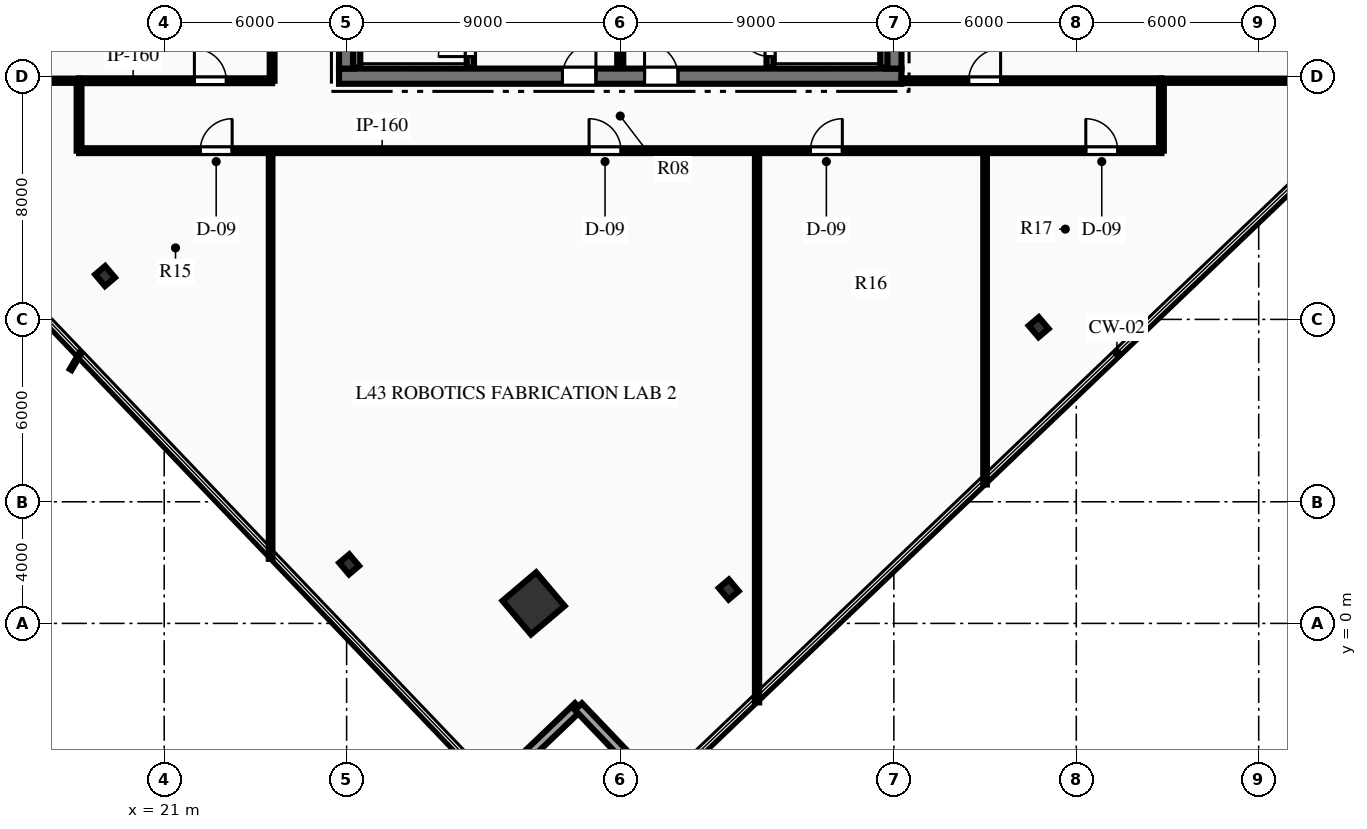
"""IFC4 building model, lengths in metres.
Left out: names, types, materials, properties, quantities, classifications, styles, units other than length and angle.
Written with IfcOpenShell. Run it as: python <this file> out.ifc"""

import sys

from ifc_helpers import new_model, si_unit, direction, frame, frame_2d, origin, origin_2d, place, context, subcontext, project, spatial, rectangle, hollow_rectangle, i_section, extrude, element, fill, save


model = new_model("IFC4")
c1 = context("Model", 3, precision=1e-05, world=origin(), true_north=direction((0.0, 1.0)))
c2 = subcontext(c1, "Body", "Model", "MODEL_VIEW")
j1 = project(units=[si_unit("LENGTHUNIT", "METRE"), si_unit("PLANEANGLEUNIT", "RADIAN")], contexts=[c1])
p1 = place(None, origin())
s1 = spatial("IfcSite", under=j1, at=p1, CompositionType="ELEMENT")
p2 = place(p1, origin())
s2 = spatial("IfcBuilding", under=s1, at=p2, CompositionType="ELEMENT")
p3 = place(p2, frame((0.0, 0.0, 174.45)))
s3 = spatial("IfcBuildingStorey", under=s2, at=p3, CompositionType="ELEMENT", Elevation=174.45)
p4 = place(p3, frame((26.75, 18.0, 0.0), z_axis=(0.0, 0.0, 1.0), x_axis=(1.0, 0.0, 0.0)))
e1 = element("IfcWall", 1, at=p4, inside=s3, PredefinedType="SHEAR", context=c2, shape_type="SweptSolid", body=[
    extrude(rectangle(XDim=18.5, YDim=0.5, at=frame_2d((9.25, 0.0))), origin(), (0.0, 0.0, 1.0), 3.75),
])
p5 = place(p4, frame((7.35, 0.0, 0.0)))
e2 = element("IfcOpeningElement", 2, at=p5, cuts=e1, PredefinedType="OPENING", context=c2, shape_type="SweptSolid", body=[
    extrude(rectangle(XDim=1.1, YDim=2.15, at=frame_2d((0.55, 1.075))), frame((0.0, 0.26, 0.0), z_axis=(0.0, -1.0, 0.0), x_axis=(1.0, 0.0, 0.0)), (0.0, 0.0, 1.0), 0.52),
])
p6 = place(p4, frame((10.05, 0.0, 0.0)))
e3 = element("IfcOpeningElement", 3, at=p6, cuts=e1, PredefinedType="OPENING", context=c2, shape_type="SweptSolid", body=[
    extrude(rectangle(XDim=1.1, YDim=2.15, at=frame_2d((0.55, 1.075))), frame((0.0, 0.26, 0.0), z_axis=(0.0, -1.0, 0.0), x_axis=(1.0, 0.0, 0.0)), (0.0, 0.0, 1.0), 0.52),
])
p7 = place(p3, frame((27.0, 18.25, 0.0), z_axis=(0.0, 0.0, 1.0), x_axis=(0.0, 1.0, 0.0)))
e4 = element("IfcWall", 4, at=p7, inside=s3, PredefinedType="SHEAR", context=c2, shape_type="SweptSolid", body=[
    extrude(rectangle(XDim=15.5, YDim=0.5, at=frame_2d((7.75, 0.0))), origin(), (0.0, 0.0, 1.0), 3.75),
])
p8 = place(p7, frame((9.99, 0.0, 0.0)))
e5 = element("IfcOpeningElement", 5, at=p8, cuts=e4, PredefinedType="OPENING", context=c2, shape_type="SweptSolid", body=[
    extrude(rectangle(XDim=1.4, YDim=2.2, at=frame_2d((0.7, 1.1))), frame((0.0, 0.26, 0.0), z_axis=(0.0, -1.0, 0.0), x_axis=(1.0, 0.0, 0.0)), (0.0, 0.0, 1.0), 0.52),
])
p9 = place(p3, frame((45.0, 18.25, 0.0), z_axis=(0.0, 0.0, 1.0), x_axis=(0.0, 1.0, 0.0)))
e6 = element("IfcWall", 6, at=p9, inside=s3, PredefinedType="SHEAR", context=c2, shape_type="SweptSolid", body=[
    extrude(rectangle(XDim=15.5, YDim=0.5, at=frame_2d((7.75, 0.0))), origin(), (0.0, 0.0, 1.0), 3.75),
])
p10 = place(p9, frame((9.99, 0.0, 0.0)))
e7 = element("IfcOpeningElement", 7, at=p10, cuts=e6, PredefinedType="OPENING", context=c2, shape_type="SweptSolid", body=[
    extrude(rectangle(XDim=1.4, YDim=2.2, at=frame_2d((0.7, 1.1))), frame((0.0, 0.26, 0.0), z_axis=(0.0, -1.0, 0.0), x_axis=(1.0, 0.0, 0.0)), (0.0, 0.0, 1.0), 0.52),
])
p11 = place(p3, frame((31.07, 18.28, 0.0), z_axis=(0.0, 0.0, 1.0), x_axis=(0.0, 1.0, 0.0)))
e8 = element("IfcWall", 8, at=p11, inside=s3, PredefinedType="SHEAR", context=c2, shape_type="SweptSolid", body=[
    extrude(rectangle(XDim=8.26, YDim=0.24, at=frame_2d((4.13, 0.0))), origin(), (0.0, 0.0, 1.0), 3.75),
])
p12 = place(p11, frame((0.365, 0.0, 0.0)))
e9 = element("IfcOpeningElement", 9, at=p12, cuts=e8, PredefinedType="OPENING", context=c2, shape_type="SweptSolid", body=[
    extrude(rectangle(XDim=1.05, YDim=2.15, at=frame_2d((0.525, 1.075))), frame((0.0, 0.13, 0.0), z_axis=(0.0, -1.0, 0.0), x_axis=(1.0, 0.0, 0.0)), (0.0, 0.0, 1.0), 0.26),
])
p13 = place(p3, frame((27.33, 18.28, 0.0), z_axis=(0.0, 0.0, 1.0), x_axis=(0.0, 1.0, 0.0)))
e10 = element("IfcWall", 10, at=p13, inside=s3, PredefinedType="SHEAR", context=c2, shape_type="SweptSolid", body=[
    extrude(rectangle(XDim=8.26, YDim=0.24, at=frame_2d((4.13, 0.0))), origin(), (0.0, 0.0, 1.0), 3.75),
])
p14 = place(p3, frame((40.93, 18.28, 0.0), z_axis=(0.0, 0.0, 1.0), x_axis=(0.0, 1.0, 0.0)))
e11 = element("IfcWall", 11, at=p14, inside=s3, PredefinedType="SHEAR", context=c2, shape_type="SweptSolid", body=[
    extrude(rectangle(XDim=8.26, YDim=0.24, at=frame_2d((4.13, 0.0))), origin(), (0.0, 0.0, 1.0), 3.75),
])
p15 = place(p14, frame((0.365, 0.0, 0.0)))
e12 = element("IfcOpeningElement", 12, at=p15, cuts=e11, PredefinedType="OPENING", context=c2, shape_type="SweptSolid", body=[
    extrude(rectangle(XDim=1.05, YDim=2.15, at=frame_2d((0.525, 1.075))), frame((0.0, 0.13, 0.0), z_axis=(0.0, -1.0, 0.0), x_axis=(1.0, 0.0, 0.0)), (0.0, 0.0, 1.0), 0.26),
])
p16 = place(p3, frame((44.67, 18.28, 0.0), z_axis=(0.0, 0.0, 1.0), x_axis=(0.0, 1.0, 0.0)))
e13 = element("IfcWall", 13, at=p16, inside=s3, PredefinedType="SHEAR", context=c2, shape_type="SweptSolid", body=[
    extrude(rectangle(XDim=8.26, YDim=0.24, at=frame_2d((4.13, 0.0))), origin(), (0.0, 0.0, 1.0), 3.75),
])
p17 = place(p3, frame((33.149, 0.658, 0.0), z_axis=(0.0, 0.0, 1.0), x_axis=(0.763232469783, 0.646123979643, 0.0)))
e14 = element("IfcColumn", 14, at=p17, inside=s3, PredefinedType="COLUMN", context=c2, shape_type="SweptSolid", body=[
    extrude(hollow_rectangle(XDim=1.45, YDim=1.45, WallThickness=0.07, at=origin_2d()), origin(), (0.0, 0.0, 1.0), 3.75),
])
for number, where, z_axis, x_axis in (
    (15, (39.569, 1.114, 0.0), (0.0, 0.0, 1.0), (0.763, 0.646, 0.0)),
    (16, (49.762, 9.743, 0.0), (0.0, 0.0, 1.0), (0.763, 0.646, 0.0)),
    (17, (19.055, 11.426, 0.0), (0.0, 0.0, 1.0), (0.763, 0.646, 0.0)),
    (18, (27.083, 1.942, 0.0), (0.0, 0.0, 1.0), (0.763, 0.646, 0.0)),
):
    element("IfcColumn", number, at=place(p3, frame(where, z_axis=z_axis, x_axis=x_axis)), inside=s3, PredefinedType="COLUMN", context=c2, shape_type="SweptSolid", body=[
        extrude(i_section(OverallWidth=0.432, OverallDepth=0.498, WebThickness=0.056, FlangeThickness=0.089, at=origin_2d()), origin(), (0.0, 0.0, 1.0), 3.75),
    ])
for number, where, z_axis, x_axis in (
    (19, (34.623, -2.738, 0.0), (0.0, 0.0, 1.0), (-0.723, -0.691, 0.0)),
    (20, (37.386, -5.63, 0.0), (0.0, 0.0, 1.0), (-0.691, 0.723, 0.0)),
):
    element("IfcWall", number, at=place(p3, frame(where, z_axis=z_axis, x_axis=x_axis)), inside=s3, PredefinedType="STANDARD", context=c2, shape_type="SweptSolid", body=[
        extrude(rectangle(XDim=4.0, YDim=0.32, at=frame_2d((2.0, 0.0))), origin(), (0.0, 0.0, 1.0), 3.46),
    ])
p18 = place(p3, frame((36.0, 18.28, 0.0), z_axis=(0.0, 0.0, 1.0), x_axis=(0.0, 1.0, 0.0)))
e21 = element("IfcWall", 21, at=p18, inside=s3, PredefinedType="PARTITIONING", context=c2, shape_type="SweptSolid", body=[
    extrude(rectangle(XDim=3.77, YDim=0.2, at=frame_2d((1.885, 0.0))), origin(), (0.0, 0.0, 1.0), 3.46),
])
p19 = place(p3, frame((18.2, 15.55, 0.0), z_axis=(0.0, 0.0, 1.0), x_axis=(1.0, 0.0, 0.0)))
e22 = element("IfcWall", 22, at=p19, inside=s3, PredefinedType="PARTITIONING", context=c2, shape_type="SweptSolid", body=[
    extrude(rectangle(XDim=35.6, YDim=0.16, at=frame_2d((17.8, 0.0))), origin(), (0.0, 0.0, 1.0), 3.46),
])
p20 = place(p19, frame((3.985, 0.0, 0.0)))
e23 = element("IfcOpeningElement", 23, at=p20, cuts=e22, PredefinedType="OPENING", context=c2, shape_type="SweptSolid", body=[
    extrude(rectangle(XDim=1.05, YDim=2.15, at=frame_2d((0.525, 1.075))), frame((0.0, 0.09, 0.0), z_axis=(0.0, -1.0, 0.0), x_axis=(1.0, 0.0, 0.0)), (0.0, 0.0, 1.0), 0.18),
])
p21 = place(p19, frame((16.775, 0.0, 0.0)))
e24 = element("IfcOpeningElement", 24, at=p21, cuts=e22, PredefinedType="OPENING", context=c2, shape_type="SweptSolid", body=[
    extrude(rectangle(XDim=1.05, YDim=2.15, at=frame_2d((0.525, 1.075))), frame((0.0, 0.09, 0.0), z_axis=(0.0, -1.0, 0.0), x_axis=(1.0, 0.0, 0.0)), (0.0, 0.0, 1.0), 0.18),
])
p22 = place(p19, frame((24.055, 0.0, 0.0)))
e25 = element("IfcOpeningElement", 25, at=p22, cuts=e22, PredefinedType="OPENING", context=c2, shape_type="SweptSolid", body=[
    extrude(rectangle(XDim=1.05, YDim=2.15, at=frame_2d((0.525, 1.075))), frame((0.0, 0.09, 0.0), z_axis=(0.0, -1.0, 0.0), x_axis=(1.0, 0.0, 0.0)), (0.0, 0.0, 1.0), 0.18),
])
p23 = place(p19, frame((33.113, 0.0, 0.0)))
e26 = element("IfcOpeningElement", 26, at=p23, cuts=e22, PredefinedType="OPENING", context=c2, shape_type="SweptSolid", body=[
    extrude(rectangle(XDim=1.05, YDim=2.15, at=frame_2d((0.525, 1.075))), frame((0.0, 0.09, 0.0), z_axis=(0.0, -1.0, 0.0), x_axis=(1.0, 0.0, 0.0)), (0.0, 0.0, 1.0), 0.18),
])
p24 = place(p3, frame((18.2, 17.85, 0.0), z_axis=(0.0, 0.0, 1.0), x_axis=(1.0, 0.0, 0.0)))
e27 = element("IfcWall", 27, at=p24, inside=s3, PredefinedType="PARTITIONING", context=c2, shape_type="SweptSolid", body=[
    extrude(rectangle(XDim=6.35, YDim=0.16, at=frame_2d((3.175, 0.0))), origin(), (0.0, 0.0, 1.0), 3.46),
])
p25 = place(p24, frame((3.793, 0.0, 0.0)))
e28 = element("IfcOpeningElement", 28, at=p25, cuts=e27, PredefinedType="OPENING", context=c2, shape_type="SweptSolid", body=[
    extrude(rectangle(XDim=1.05, YDim=2.15, at=frame_2d((0.525, 1.075))), frame((0.0, 0.09, 0.0), z_axis=(0.0, -1.0, 0.0), x_axis=(1.0, 0.0, 0.0)), (0.0, 0.0, 1.0), 0.18),
])
p26 = place(p3, frame((45.25, 17.85, 0.0), z_axis=(0.0, 0.0, 1.0), x_axis=(1.0, 0.0, 0.0)))
e29 = element("IfcWall", 29, at=p26, inside=s3, PredefinedType="PARTITIONING", context=c2, shape_type="SweptSolid", body=[
    extrude(rectangle(XDim=8.55, YDim=0.16, at=frame_2d((4.275, 0.0))), origin(), (0.0, 0.0, 1.0), 2.839),
])
p27 = place(p26, frame((2.211, 0.0, 0.0)))
e30 = element("IfcOpeningElement", 30, at=p27, cuts=e29, PredefinedType="OPENING", context=c2, shape_type="SweptSolid", body=[
    extrude(rectangle(XDim=1.05, YDim=2.15, at=frame_2d((0.525, 1.075))), frame((0.0, 0.09, 0.0), z_axis=(0.0, -1.0, 0.0), x_axis=(1.0, 0.0, 0.0)), (0.0, 0.0, 1.0), 0.18),
])
p28 = place(p3, frame((24.55, 17.85, 0.0), z_axis=(0.0, 0.0, 1.0), x_axis=(0.0, 1.0, 0.0)))
e31 = element("IfcWall", 31, at=p28, inside=s3, PredefinedType="PARTITIONING", context=c2, shape_type="SweptSolid", body=[
    extrude(rectangle(XDim=16.3, YDim=0.16, at=frame_2d((8.15, 0.0))), origin(), (0.0, 0.0, 1.0), 3.46),
])
p29 = place(p28, frame((6.625, 0.0, 0.0)))
e32 = element("IfcOpeningElement", 32, at=p29, cuts=e31, PredefinedType="OPENING", context=c2, shape_type="SweptSolid", body=[
    extrude(rectangle(XDim=1.05, YDim=2.15, at=frame_2d((0.525, 1.075))), frame((0.0, 0.09, 0.0), z_axis=(0.0, -1.0, 0.0), x_axis=(1.0, 0.0, 0.0)), (0.0, 0.0, 1.0), 0.18),
])
p30 = place(p28, frame((11.367, 0.0, 0.0)))
e33 = element("IfcOpeningElement", 33, at=p30, cuts=e31, PredefinedType="OPENING", context=c2, shape_type="SweptSolid", body=[
    extrude(rectangle(XDim=1.05, YDim=2.15, at=frame_2d((0.525, 1.075))), frame((0.0, 0.09, 0.0), z_axis=(0.0, -1.0, 0.0), x_axis=(1.0, 0.0, 0.0)), (0.0, 0.0, 1.0), 0.18),
])
for number, where, z_axis, x_axis in (
    (34, (18.2, 15.55, 0.0), (0.0, 0.0, 1.0), (0.0, 1.0, 0.0)),
    (35, (53.8, 15.55, 0.0), (0.0, 0.0, 1.0), (0.0, 1.0, 0.0)),
):
    element("IfcWall", number, at=place(p3, frame(where, z_axis=z_axis, x_axis=x_axis)), inside=s3, PredefinedType="PARTITIONING", context=c2, shape_type="SweptSolid", body=[
        extrude(rectangle(XDim=2.3, YDim=0.16, at=frame_2d((1.15, 0.0))), origin(), (0.0, 0.0, 1.0), 3.46),
    ])
p31 = place(p3, frame((9.471, 17.85, 0.0), z_axis=(0.0, 0.0, 1.0), x_axis=(1.0, 0.0, 0.0)))
e36 = element("IfcWall", 36, at=p31, inside=s3, PredefinedType="PARTITIONING", context=c2, shape_type="SweptSolid", body=[
    extrude(rectangle(XDim=8.729, YDim=0.14, at=frame_2d((4.364, 0.0))), origin(), (0.0, 0.0, 1.0), 3.46),
])
p32 = place(p3, frame((53.8, 17.85, 0.0), z_axis=(0.0, 0.0, 1.0), x_axis=(1.0, 0.0, 0.0)))
e37 = element("IfcWall", 37, at=p32, inside=s3, PredefinedType="PARTITIONING", context=c2, shape_type="SweptSolid", body=[
    extrude(rectangle(XDim=8.098, YDim=0.14, at=frame_2d((4.049, 0.0))), origin(), (0.0, 0.0, 1.0), 2.839),
])
p33 = place(p3, frame((24.5, 2.123, 0.0), z_axis=(0.0, 0.0, 1.0), x_axis=(0.0, 1.0, 0.0)))
e38 = element("IfcWall", 38, at=p33, inside=s3, PredefinedType="PARTITIONING", context=c2, shape_type="SweptSolid", body=[
    extrude(rectangle(XDim=13.427, YDim=0.12, at=frame_2d((6.713, 0.0))), origin(), (0.0, 0.0, 1.0), 3.46),
])
p34 = place(p3, frame((40.5, -2.599, 0.0), z_axis=(0.0, 0.0, 1.0), x_axis=(0.0, 1.0, 0.0)))
e39 = element("IfcWall", 39, at=p34, inside=s3, PredefinedType="PARTITIONING", context=c2, shape_type="SweptSolid", body=[
    extrude(rectangle(XDim=18.149, YDim=0.14, at=frame_2d((9.074, 0.0))), origin(), (0.0, 0.0, 1.0), 3.46),
])
p35 = place(p3, frame((48.0, 4.568, 0.0), z_axis=(0.0, 0.0, 1.0), x_axis=(0.0, 1.0, 0.0)))
e40 = element("IfcWall", 40, at=p35, inside=s3, PredefinedType="PARTITIONING", context=c2, shape_type="SweptSolid", body=[
    extrude(rectangle(XDim=10.982, YDim=0.12, at=frame_2d((5.491, 0.0))), origin(), (0.0, 0.0, 1.0), 3.46),
])
p36 = place(p12, origin())
e41 = element("IfcDoor", 41, at=p36, inside=s3, OperationType="SINGLE_SWING_LEFT", PredefinedType="DOOR", context=c2, shape_type="SweptSolid", body=[
    extrude(rectangle(XDim=1.05, YDim=2.15, at=frame_2d((0.525, 1.075))), frame((0.0, 0.025, 0.0), z_axis=(0.0, -1.0, 0.0), x_axis=(1.0, 0.0, 0.0)), (0.0, 0.0, 1.0), 0.05),
])
fill(e9, e41)
p37 = place(p15, origin())
e42 = element("IfcDoor", 42, at=p37, inside=s3, OperationType="SINGLE_SWING_RIGHT", PredefinedType="DOOR", context=c2, shape_type="SweptSolid", body=[
    extrude(rectangle(XDim=1.05, YDim=2.15, at=frame_2d((0.525, 1.075))), frame((0.0, 0.025, 0.0), z_axis=(0.0, -1.0, 0.0), x_axis=(1.0, 0.0, 0.0)), (0.0, 0.0, 1.0), 0.05),
])
fill(e12, e42)
p38 = place(p5, origin())
e43 = element("IfcDoor", 43, at=p38, inside=s3, OperationType="SINGLE_SWING_RIGHT", PredefinedType="DOOR", context=c2, shape_type="SweptSolid", body=[
    extrude(rectangle(XDim=1.1, YDim=2.15, at=frame_2d((0.55, 1.075))), frame((0.0, 0.025, 0.0), z_axis=(0.0, -1.0, 0.0), x_axis=(1.0, 0.0, 0.0)), (0.0, 0.0, 1.0), 0.05),
])
fill(e2, e43)
p39 = place(p6, origin())
e44 = element("IfcDoor", 44, at=p39, inside=s3, OperationType="SINGLE_SWING_LEFT", PredefinedType="DOOR", context=c2, shape_type="SweptSolid", body=[
    extrude(rectangle(XDim=1.1, YDim=2.15, at=frame_2d((0.55, 1.075))), frame((0.0, 0.025, 0.0), z_axis=(0.0, -1.0, 0.0), x_axis=(1.0, 0.0, 0.0)), (0.0, 0.0, 1.0), 0.05),
])
fill(e3, e44)
p40 = place(p20, origin())
e45 = element("IfcDoor", 45, at=p40, inside=s3, OperationType="SINGLE_SWING_RIGHT", PredefinedType="DOOR", context=c2, shape_type="SweptSolid", body=[
    extrude(rectangle(XDim=1.05, YDim=2.15, at=frame_2d((0.525, 1.075))), frame((0.0, 0.025, 0.0), z_axis=(0.0, -1.0, 0.0), x_axis=(1.0, 0.0, 0.0)), (0.0, 0.0, 1.0), 0.05),
])
fill(e23, e45)
p41 = place(p21, origin())
e46 = element("IfcDoor", 46, at=p41, inside=s3, OperationType="SINGLE_SWING_LEFT", PredefinedType="DOOR", context=c2, shape_type="SweptSolid", body=[
    extrude(rectangle(XDim=1.05, YDim=2.15, at=frame_2d((0.525, 1.075))), frame((0.0, 0.025, 0.0), z_axis=(0.0, -1.0, 0.0), x_axis=(1.0, 0.0, 0.0)), (0.0, 0.0, 1.0), 0.05),
])
fill(e24, e46)
p42 = place(p22, origin())
e47 = element("IfcDoor", 47, at=p42, inside=s3, OperationType="SINGLE_SWING_RIGHT", PredefinedType="DOOR", context=c2, shape_type="SweptSolid", body=[
    extrude(rectangle(XDim=1.05, YDim=2.15, at=frame_2d((0.525, 1.075))), frame((0.0, 0.025, 0.0), z_axis=(0.0, -1.0, 0.0), x_axis=(1.0, 0.0, 0.0)), (0.0, 0.0, 1.0), 0.05),
])
fill(e25, e47)
p43 = place(p23, origin())
e48 = element("IfcDoor", 48, at=p43, inside=s3, OperationType="SINGLE_SWING_LEFT", PredefinedType="DOOR", context=c2, shape_type="SweptSolid", body=[
    extrude(rectangle(XDim=1.05, YDim=2.15, at=frame_2d((0.525, 1.075))), frame((0.0, 0.025, 0.0), z_axis=(0.0, -1.0, 0.0), x_axis=(1.0, 0.0, 0.0)), (0.0, 0.0, 1.0), 0.05),
])
fill(e26, e48)
p44 = place(p25, origin())
e49 = element("IfcDoor", 49, at=p44, inside=s3, OperationType="SINGLE_SWING_LEFT", PredefinedType="DOOR", context=c2, shape_type="SweptSolid", body=[
    extrude(rectangle(XDim=1.05, YDim=2.15, at=frame_2d((0.525, 1.075))), frame((0.0, 0.025, 0.0), z_axis=(0.0, -1.0, 0.0), x_axis=(1.0, 0.0, 0.0)), (0.0, 0.0, 1.0), 0.05),
])
fill(e28, e49)
p45 = place(p27, origin())
e50 = element("IfcDoor", 50, at=p45, inside=s3, OperationType="SINGLE_SWING_RIGHT", PredefinedType="DOOR", context=c2, shape_type="SweptSolid", body=[
    extrude(rectangle(XDim=1.05, YDim=2.15, at=frame_2d((0.525, 1.075))), frame((0.0, 0.025, 0.0), z_axis=(0.0, -1.0, 0.0), x_axis=(1.0, 0.0, 0.0)), (0.0, 0.0, 1.0), 0.05),
])
fill(e30, e50)
save(model, sys.argv[1])
